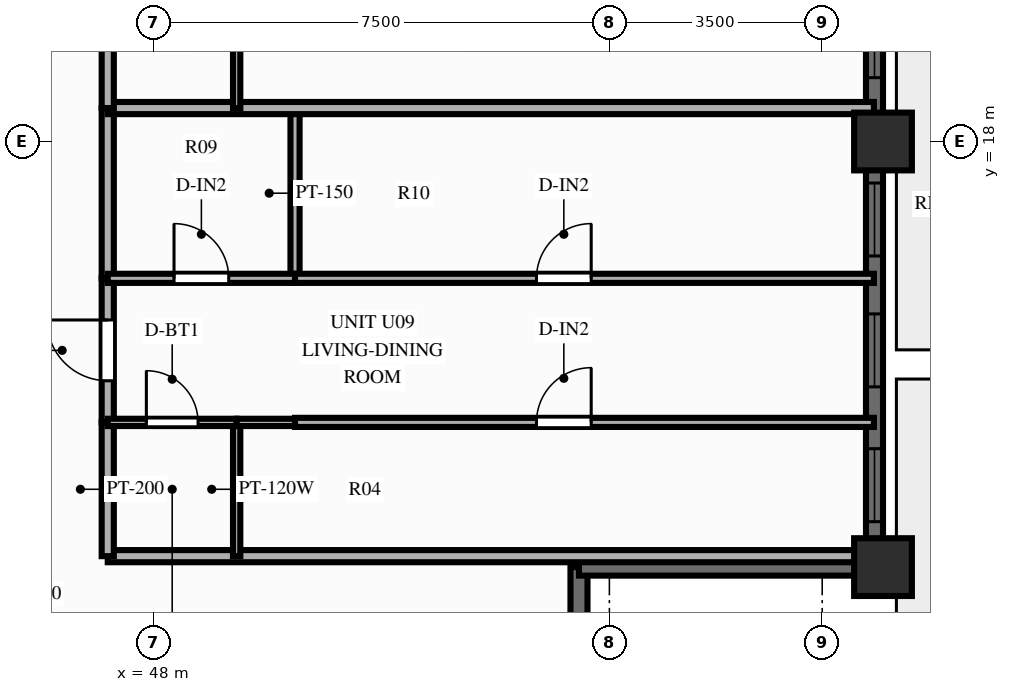
"""IFC4 building model, lengths in metres.
Left out: names, types, materials, properties, quantities, classifications, styles, units other than length and angle.
Written with IfcOpenShell. Run it as: python <this file> out.ifc"""

import sys

from ifc_helpers import new_model, si_unit, direction, frame, frame_2d, origin, origin_2d, place, context, subcontext, project, spatial, rectangle, extrude, source, transform, mapped, element, fill, save


model = new_model("IFC4")
c1 = context("Model", 3, precision=1e-05, world=origin(), true_north=direction((0.0, 1.0)))
c2 = subcontext(c1, "Body", "Model", "MODEL_VIEW")
j1 = project(units=[si_unit("LENGTHUNIT", "METRE"), si_unit("PLANEANGLEUNIT", "RADIAN")], contexts=[c1])
p1 = place(None, origin())
s1 = spatial("IfcSite", under=j1, at=p1, CompositionType="ELEMENT")
p2 = place(p1, origin())
s2 = spatial("IfcBuilding", under=s1, at=p2, CompositionType="ELEMENT")
p3 = place(p2, frame((0.0, 0.0, 152.2)))
s3 = spatial("IfcBuildingStorey", under=s2, at=p3, CompositionType="ELEMENT", Elevation=152.2)
m1 = source(origin(), c2, "Body", "SweptSolid", [
    extrude(rectangle(XDim=0.95, YDim=0.95, at=origin_2d()), origin(), (0.0, 0.0, 1.0), 3.9),
])
for number, where, z_axis, x_axis in (
    (1, (60.0, 11.0, 0.0), (0.0, 0.0, 1.0), (1.0, 0.0, 0.0)),
    (2, (60.0, 18.0, 0.0), (0.0, 0.0, 1.0), (1.0, 0.0, 0.0)),
):
    element("IfcColumn", number, at=place(p3, frame(where, z_axis=z_axis, x_axis=x_axis)), inside=s3, PredefinedType="COLUMN", context=c2, shape_type="MappedRepresentation", body=[
        mapped(m1, transform((0.0, 0.0, 0.0), scale=1.0)),
    ])
p4 = place(p3, frame((59.86, 11.0, 0.0), z_axis=(0.0, 0.0, 1.0), x_axis=(0.0, 1.0, 0.0)))
e3 = element("IfcWall", 3, at=p4, inside=s3, PredefinedType="SOLIDWALL", context=c2, shape_type="SweptSolid", body=[
    extrude(rectangle(XDim=32.0, YDim=0.28, at=frame_2d((16.0, 0.0))), origin(), (0.0, 0.0, 1.0), 2.44),
])
p5 = place(p4, frame((0.748, 0.0, 0.25)))
e4 = element("IfcOpeningElement", 4, at=p5, cuts=e3, PredefinedType="OPENING", context=c2, shape_type="SweptSolid", body=[
    extrude(rectangle(XDim=1.2, YDim=1.5, at=frame_2d((0.6, 0.75))), frame((0.0, 0.152, 0.0), z_axis=(0.0, -1.0, 0.0), x_axis=(1.0, 0.0, 0.0)), (0.0, 0.0, 1.0), 0.304),
])
p6 = place(p4, frame((2.965, 0.0, 0.25)))
e5 = element("IfcOpeningElement", 5, at=p6, cuts=e3, PredefinedType="OPENING", context=c2, shape_type="SweptSolid", body=[
    extrude(rectangle(XDim=1.2, YDim=1.5, at=frame_2d((0.6, 0.75))), frame((0.0, 0.152, 0.0), z_axis=(0.0, -1.0, 0.0), x_axis=(1.0, 0.0, 0.0)), (0.0, 0.0, 1.0), 0.304),
])
p7 = place(p4, frame((5.117, 0.0, 0.25)))
e6 = element("IfcOpeningElement", 6, at=p7, cuts=e3, PredefinedType="OPENING", context=c2, shape_type="SweptSolid", body=[
    extrude(rectangle(XDim=1.2, YDim=1.5, at=frame_2d((0.6, 0.75))), frame((0.0, 0.152, 0.0), z_axis=(0.0, -1.0, 0.0), x_axis=(1.0, 0.0, 0.0)), (0.0, 0.0, 1.0), 0.304),
])
p8 = place(p4, frame((8.05, 0.0, 0.25)))
e7 = element("IfcOpeningElement", 7, at=p8, cuts=e3, PredefinedType="OPENING", context=c2, shape_type="SweptSolid", body=[
    extrude(rectangle(XDim=1.2, YDim=1.5, at=frame_2d((0.6, 0.75))), frame((0.0, 0.152, 0.0), z_axis=(0.0, -1.0, 0.0), x_axis=(1.0, 0.0, 0.0)), (0.0, 0.0, 1.0), 0.304),
])
p9 = place(p4, frame((10.335, 0.0, 0.25)))
e8 = element("IfcOpeningElement", 8, at=p9, cuts=e3, PredefinedType="OPENING", context=c2, shape_type="SweptSolid", body=[
    extrude(rectangle(XDim=1.2, YDim=1.5, at=frame_2d((0.6, 0.75))), frame((0.0, 0.152, 0.0), z_axis=(0.0, -1.0, 0.0), x_axis=(1.0, 0.0, 0.0)), (0.0, 0.0, 1.0), 0.304),
])
p10 = place(p4, frame((12.92, 0.0, 0.25)))
e9 = element("IfcOpeningElement", 9, at=p10, cuts=e3, PredefinedType="OPENING", context=c2, shape_type="SweptSolid", body=[
    extrude(rectangle(XDim=1.2, YDim=1.5, at=frame_2d((0.6, 0.75))), frame((0.0, 0.152, 0.0), z_axis=(0.0, -1.0, 0.0), x_axis=(1.0, 0.0, 0.0)), (0.0, 0.0, 1.0), 0.304),
])
p11 = place(p4, frame((15.4, 0.0, 0.25)))
e10 = element("IfcOpeningElement", 10, at=p11, cuts=e3, PredefinedType="OPENING", context=c2, shape_type="SweptSolid", body=[
    extrude(rectangle(XDim=1.2, YDim=1.5, at=frame_2d((0.6, 0.75))), frame((0.0, 0.152, 0.0), z_axis=(0.0, -1.0, 0.0), x_axis=(1.0, 0.0, 0.0)), (0.0, 0.0, 1.0), 0.304),
])
p12 = place(p4, frame((17.58, 0.0, 0.25)))
e11 = element("IfcOpeningElement", 11, at=p12, cuts=e3, PredefinedType="OPENING", context=c2, shape_type="SweptSolid", body=[
    extrude(rectangle(XDim=1.2, YDim=1.5, at=frame_2d((0.6, 0.75))), frame((0.0, 0.152, 0.0), z_axis=(0.0, -1.0, 0.0), x_axis=(1.0, 0.0, 0.0)), (0.0, 0.0, 1.0), 0.304),
])
p13 = place(p4, frame((19.865, 0.0, 0.25)))
e12 = element("IfcOpeningElement", 12, at=p13, cuts=e3, PredefinedType="OPENING", context=c2, shape_type="SweptSolid", body=[
    extrude(rectangle(XDim=1.2, YDim=1.5, at=frame_2d((0.6, 0.75))), frame((0.0, 0.152, 0.0), z_axis=(0.0, -1.0, 0.0), x_axis=(1.0, 0.0, 0.0)), (0.0, 0.0, 1.0), 0.304),
])
p14 = place(p4, frame((22.45, 0.0, 0.25)))
e13 = element("IfcOpeningElement", 13, at=p14, cuts=e3, PredefinedType="OPENING", context=c2, shape_type="SweptSolid", body=[
    extrude(rectangle(XDim=1.2, YDim=1.5, at=frame_2d((0.6, 0.75))), frame((0.0, 0.152, 0.0), z_axis=(0.0, -1.0, 0.0), x_axis=(1.0, 0.0, 0.0)), (0.0, 0.0, 1.0), 0.304),
])
p15 = place(p4, frame((25.633, 0.0, 0.25)))
e14 = element("IfcOpeningElement", 14, at=p15, cuts=e3, PredefinedType="OPENING", context=c2, shape_type="SweptSolid", body=[
    extrude(rectangle(XDim=0.7, YDim=1.5, at=frame_2d((0.35, 0.75))), frame((0.0, 0.152, 0.0), z_axis=(0.0, -1.0, 0.0), x_axis=(1.0, 0.0, 0.0)), (0.0, 0.0, 1.0), 0.304),
])
p16 = place(p4, frame((27.235, 0.0, 0.25)))
e15 = element("IfcOpeningElement", 15, at=p16, cuts=e3, PredefinedType="OPENING", context=c2, shape_type="SweptSolid", body=[
    extrude(rectangle(XDim=1.2, YDim=1.5, at=frame_2d((0.6, 0.75))), frame((0.0, 0.152, 0.0), z_axis=(0.0, -1.0, 0.0), x_axis=(1.0, 0.0, 0.0)), (0.0, 0.0, 1.0), 0.304),
])
p17 = place(p4, frame((29.752, 0.0, 0.25)))
e16 = element("IfcOpeningElement", 16, at=p17, cuts=e3, PredefinedType="OPENING", context=c2, shape_type="SweptSolid", body=[
    extrude(rectangle(XDim=1.2, YDim=1.5, at=frame_2d((0.6, 0.75))), frame((0.0, 0.152, 0.0), z_axis=(0.0, -1.0, 0.0), x_axis=(1.0, 0.0, 0.0)), (0.0, 0.0, 1.0), 0.304),
])
for number, where, z_axis, x_axis in (
    (17, (55.0, 6.08, 0.0), (0.0, 0.0, 1.0), (0.0, 1.0, 0.0)),
    (18, (55.0, 11.0, 0.0), (0.0, 0.0, 1.0), (1.0, 0.0, 0.0)),
):
    element("IfcWall", number, at=place(p3, frame(where, z_axis=z_axis, x_axis=x_axis)), inside=s3, PredefinedType="SOLIDWALL", context=c2, shape_type="SweptSolid", body=[
        extrude(rectangle(XDim=4.92, YDim=0.28, at=frame_2d((2.46, 0.0))), origin(), (0.0, 0.0, 1.0), 2.44),
    ])
p18 = place(p3, frame((47.25, 11.18, 0.0), z_axis=(0.0, 0.0, 1.0), x_axis=(1.0, 0.0, 0.0)))
e19 = element("IfcWall", 19, at=p18, inside=s3, PredefinedType="PARTITIONING", context=c2, shape_type="SweptSolid", body=[
    extrude(rectangle(XDim=12.6, YDim=0.2, at=frame_2d((6.3, 0.0))), origin(), (0.0, 0.0, 1.0), 3.56),
])
p19 = place(p3, frame((47.25, 11.18, 0.0), z_axis=(0.0, 0.0, 1.0), x_axis=(0.0, 1.0, 0.0)))
e20 = element("IfcWall", 20, at=p19, inside=s3, PredefinedType="PARTITIONING", context=c2, shape_type="SweptSolid", body=[
    extrude(rectangle(XDim=2.2, YDim=0.2, at=frame_2d((1.1, 0.0))), origin(), (0.0, 0.0, 1.0), 3.56),
])
p20 = place(p3, frame((47.25, 13.38, 0.0), z_axis=(0.0, 0.0, 1.0), x_axis=(0.0, 1.0, 0.0)))
e21 = element("IfcWall", 21, at=p20, inside=s3, PredefinedType="PARTITIONING", context=c2, shape_type="SweptSolid", body=[
    extrude(rectangle(XDim=2.37, YDim=0.2, at=frame_2d((1.185, 0.0))), origin(), (0.0, 0.0, 1.0), 3.56),
])
p21 = place(p20, frame((0.685, 0.0, 0.0)))
e22 = element("IfcOpeningElement", 22, at=p21, cuts=e21, PredefinedType="OPENING", context=c2, shape_type="SweptSolid", body=[
    extrude(rectangle(XDim=1.0, YDim=2.15, at=frame_2d((0.5, 1.075))), frame((0.0, 0.112, 0.0), z_axis=(0.0, -1.0, 0.0), x_axis=(1.0, 0.0, 0.0)), (0.0, 0.0, 1.0), 0.224),
])
p22 = place(p3, frame((47.25, 15.75, 0.0), z_axis=(0.0, 0.0, 1.0), x_axis=(0.0, 1.0, 0.0)))
e23 = element("IfcWall", 23, at=p22, inside=s3, PredefinedType="PARTITIONING", context=c2, shape_type="SweptSolid", body=[
    extrude(rectangle(XDim=2.801, YDim=0.2, at=frame_2d((1.4, 0.0))), origin(), (0.0, 0.0, 1.0), 3.56),
])
p23 = place(p3, frame((49.37, 11.18, 0.0), z_axis=(0.0, 0.0, 1.0), x_axis=(0.0, 1.0, 0.0)))
e24 = element("IfcWall", 24, at=p23, inside=s3, PredefinedType="PARTITIONING", context=c2, shape_type="SweptSolid", body=[
    extrude(rectangle(XDim=2.2, YDim=0.12, at=frame_2d((1.1, 0.0))), origin(), (0.0, 0.0, 1.0), 3.56),
])
p24 = place(p3, frame((50.33, 15.75, 0.0), z_axis=(0.0, 0.0, 1.0), x_axis=(0.0, 1.0, 0.0)))
e25 = element("IfcWall", 25, at=p24, inside=s3, PredefinedType="PARTITIONING", context=c2, shape_type="SweptSolid", body=[
    extrude(rectangle(XDim=2.801, YDim=0.15, at=frame_2d((1.4, 0.0))), origin(), (0.0, 0.0, 1.0), 3.56),
])
p25 = place(p3, frame((47.25, 13.38, 0.0), z_axis=(0.0, 0.0, 1.0), x_axis=(1.0, 0.0, 0.0)))
e26 = element("IfcWall", 26, at=p25, inside=s3, PredefinedType="PARTITIONING", context=c2, shape_type="SweptSolid", body=[
    extrude(rectangle(XDim=2.12, YDim=0.12, at=frame_2d((1.06, 0.0))), origin(), (0.0, 0.0, 1.0), 3.56),
])
p26 = place(p25, frame((0.635, 0.0, 0.0)))
e27 = element("IfcOpeningElement", 27, at=p26, cuts=e26, PredefinedType="OPENING", context=c2, shape_type="SweptSolid", body=[
    extrude(rectangle(XDim=0.85, YDim=2.05, at=frame_2d((0.425, 1.025))), frame((0.0, 0.072, 0.0), z_axis=(0.0, -1.0, 0.0), x_axis=(1.0, 0.0, 0.0)), (0.0, 0.0, 1.0), 0.144),
])
p27 = place(p3, frame((49.37, 13.38, 0.0), z_axis=(0.0, 0.0, 1.0), x_axis=(1.0, 0.0, 0.0)))
e28 = element("IfcWall", 28, at=p27, inside=s3, PredefinedType="PARTITIONING", context=c2, shape_type="SweptSolid", body=[
    extrude(rectangle(XDim=0.96, YDim=0.12, at=frame_2d((0.48, 0.0))), origin(), (0.0, 0.0, 1.0), 3.56),
])
p28 = place(p3, frame((50.33, 13.38, 0.0), z_axis=(0.0, 0.0, 1.0), x_axis=(1.0, 0.0, 0.0)))
e29 = element("IfcWall", 29, at=p28, inside=s3, PredefinedType="PARTITIONING", context=c2, shape_type="SweptSolid", body=[
    extrude(rectangle(XDim=9.52, YDim=0.15, at=frame_2d((4.76, 0.0))), origin(), (0.0, 0.0, 1.0), 3.56),
])
p29 = place(p28, frame((3.971, 0.0, 0.0)))
e30 = element("IfcOpeningElement", 30, at=p29, cuts=e29, PredefinedType="OPENING", context=c2, shape_type="SweptSolid", body=[
    extrude(rectangle(XDim=0.9, YDim=2.1, at=frame_2d((0.45, 1.05))), frame((0.0, 0.087, 0.0), z_axis=(0.0, -1.0, 0.0), x_axis=(1.0, 0.0, 0.0)), (0.0, 0.0, 1.0), 0.174),
])
p30 = place(p3, frame((47.25, 15.75, 0.0), z_axis=(0.0, 0.0, 1.0), x_axis=(1.0, 0.0, 0.0)))
e31 = element("IfcWall", 31, at=p30, inside=s3, PredefinedType="PARTITIONING", context=c2, shape_type="SweptSolid", body=[
    extrude(rectangle(XDim=3.08, YDim=0.15, at=frame_2d((1.54, 0.0))), origin(), (0.0, 0.0, 1.0), 3.56),
])
p31 = place(p30, frame((1.09, 0.0, 0.0)))
e32 = element("IfcOpeningElement", 32, at=p31, cuts=e31, PredefinedType="OPENING", context=c2, shape_type="SweptSolid", body=[
    extrude(rectangle(XDim=0.9, YDim=2.1, at=frame_2d((0.45, 1.05))), frame((0.0, 0.087, 0.0), z_axis=(0.0, -1.0, 0.0), x_axis=(1.0, 0.0, 0.0)), (0.0, 0.0, 1.0), 0.174),
])
p32 = place(p3, frame((50.33, 15.75, 0.0), z_axis=(0.0, 0.0, 1.0), x_axis=(1.0, 0.0, 0.0)))
e33 = element("IfcWall", 33, at=p32, inside=s3, PredefinedType="PARTITIONING", context=c2, shape_type="SweptSolid", body=[
    extrude(rectangle(XDim=9.52, YDim=0.15, at=frame_2d((4.76, 0.0))), origin(), (0.0, 0.0, 1.0), 3.56),
])
p33 = place(p32, frame((3.971, 0.0, 0.0)))
e34 = element("IfcOpeningElement", 34, at=p33, cuts=e33, PredefinedType="OPENING", context=c2, shape_type="SweptSolid", body=[
    extrude(rectangle(XDim=0.9, YDim=2.1, at=frame_2d((0.45, 1.05))), frame((0.0, 0.087, 0.0), z_axis=(0.0, -1.0, 0.0), x_axis=(1.0, 0.0, 0.0)), (0.0, 0.0, 1.0), 0.174),
])
p34 = place(p3, frame((47.25, 18.55, 0.0), z_axis=(0.0, 0.0, 1.0), x_axis=(1.0, 0.0, 0.0)))
e35 = element("IfcWall", 35, at=p34, inside=s3, PredefinedType="PARTITIONING", context=c2, shape_type="SweptSolid", body=[
    extrude(rectangle(XDim=12.6, YDim=0.2, at=frame_2d((6.3, 0.0))), origin(), (0.0, 0.0, 1.0), 3.56),
])
p35 = place(p3, frame((47.25, 18.55, 0.0), z_axis=(0.0, 0.0, 1.0), x_axis=(0.0, 1.0, 0.0)))
e36 = element("IfcWall", 36, at=p35, inside=s3, PredefinedType="PARTITIONING", context=c2, shape_type="SweptSolid", body=[
    extrude(rectangle(XDim=2.2, YDim=0.2, at=frame_2d((1.1, 0.0))), origin(), (0.0, 0.0, 1.0), 3.56),
])
p36 = place(p3, frame((49.37, 18.55, 0.0), z_axis=(0.0, 0.0, 1.0), x_axis=(0.0, 1.0, 0.0)))
e37 = element("IfcWall", 37, at=p36, inside=s3, PredefinedType="PARTITIONING", context=c2, shape_type="SweptSolid", body=[
    extrude(rectangle(XDim=2.2, YDim=0.12, at=frame_2d((1.1, 0.0))), origin(), (0.0, 0.0, 1.0), 3.56),
])
m2 = source(origin(), c2, "Body", "SweptSolid", [
    extrude(rectangle(XDim=1.2, YDim=1.5, at=frame_2d((0.6, 0.75))), frame((0.0, 0.03, 0.0), z_axis=(0.0, -1.0, 0.0), x_axis=(1.0, 0.0, 0.0)), (0.0, 0.0, 1.0), 0.06),
])
p37 = place(p5, origin())
e38 = element("IfcWindow", 38, at=p37, inside=s3, PartitioningType="SINGLE_PANEL", PredefinedType="WINDOW", context=c2, shape_type="MappedRepresentation", body=[
    mapped(m2, transform((0.0, 0.0, 0.0), scale=1.0)),
])
fill(e4, e38)
p38 = place(p6, origin())
e39 = element("IfcWindow", 39, at=p38, inside=s3, PartitioningType="SINGLE_PANEL", PredefinedType="WINDOW", context=c2, shape_type="MappedRepresentation", body=[
    mapped(m2, transform((0.0, 0.0, 0.0), scale=1.0)),
])
fill(e5, e39)
p39 = place(p7, origin())
e40 = element("IfcWindow", 40, at=p39, inside=s3, PartitioningType="SINGLE_PANEL", PredefinedType="WINDOW", context=c2, shape_type="MappedRepresentation", body=[
    mapped(m2, transform((0.0, 0.0, 0.0), scale=1.0)),
])
fill(e6, e40)
p40 = place(p8, origin())
e41 = element("IfcWindow", 41, at=p40, inside=s3, PartitioningType="SINGLE_PANEL", PredefinedType="WINDOW", context=c2, shape_type="MappedRepresentation", body=[
    mapped(m2, transform((0.0, 0.0, 0.0), scale=1.0)),
])
fill(e7, e41)
m3 = source(origin(), c2, "Body", "SweptSolid", [
    extrude(rectangle(XDim=1.0, YDim=2.15, at=frame_2d((0.5, 1.075))), frame((0.0, 0.025, 0.0), z_axis=(0.0, -1.0, 0.0), x_axis=(1.0, 0.0, 0.0)), (0.0, 0.0, 1.0), 0.05),
])
p41 = place(p21, origin())
e42 = element("IfcDoor", 42, at=p41, inside=s3, OperationType="SINGLE_SWING_RIGHT", PredefinedType="DOOR", context=c2, shape_type="MappedRepresentation", body=[
    mapped(m3, transform((0.0, 0.0, 0.0), scale=1.0)),
])
fill(e22, e42)
m4 = source(origin(), c2, "Body", "SweptSolid", [
    extrude(rectangle(XDim=0.85, YDim=2.05, at=frame_2d((0.425, 1.025))), frame((0.0, 0.025, 0.0), z_axis=(0.0, -1.0, 0.0), x_axis=(1.0, 0.0, 0.0)), (0.0, 0.0, 1.0), 0.05),
])
p42 = place(p26, origin())
e43 = element("IfcDoor", 43, at=p42, inside=s3, OperationType="SINGLE_SWING_LEFT", PredefinedType="DOOR", context=c2, shape_type="MappedRepresentation", body=[
    mapped(m4, transform((0.0, 0.0, 0.0), scale=1.0)),
])
fill(e27, e43)
m5 = source(origin(), c2, "Body", "SweptSolid", [
    extrude(rectangle(XDim=0.9, YDim=2.1, at=frame_2d((0.45, 1.05))), frame((0.0, 0.025, 0.0), z_axis=(0.0, -1.0, 0.0), x_axis=(1.0, 0.0, 0.0)), (0.0, 0.0, 1.0), 0.05),
])
p43 = place(p29, origin())
e44 = element("IfcDoor", 44, at=p43, inside=s3, OperationType="SINGLE_SWING_RIGHT", PredefinedType="DOOR", context=c2, shape_type="MappedRepresentation", body=[
    mapped(m5, transform((0.0, 0.0, 0.0), scale=1.0)),
])
fill(e30, e44)
p44 = place(p31, origin())
e45 = element("IfcDoor", 45, at=p44, inside=s3, OperationType="SINGLE_SWING_LEFT", PredefinedType="DOOR", context=c2, shape_type="MappedRepresentation", body=[
    mapped(m5, transform((0.0, 0.0, 0.0), scale=1.0)),
])
fill(e32, e45)
p45 = place(p33, origin())
e46 = element("IfcDoor", 46, at=p45, inside=s3, OperationType="SINGLE_SWING_RIGHT", PredefinedType="DOOR", context=c2, shape_type="MappedRepresentation", body=[
    mapped(m5, transform((0.0, 0.0, 0.0), scale=1.0)),
])
fill(e34, e46)
save(model, sys.argv[1])
